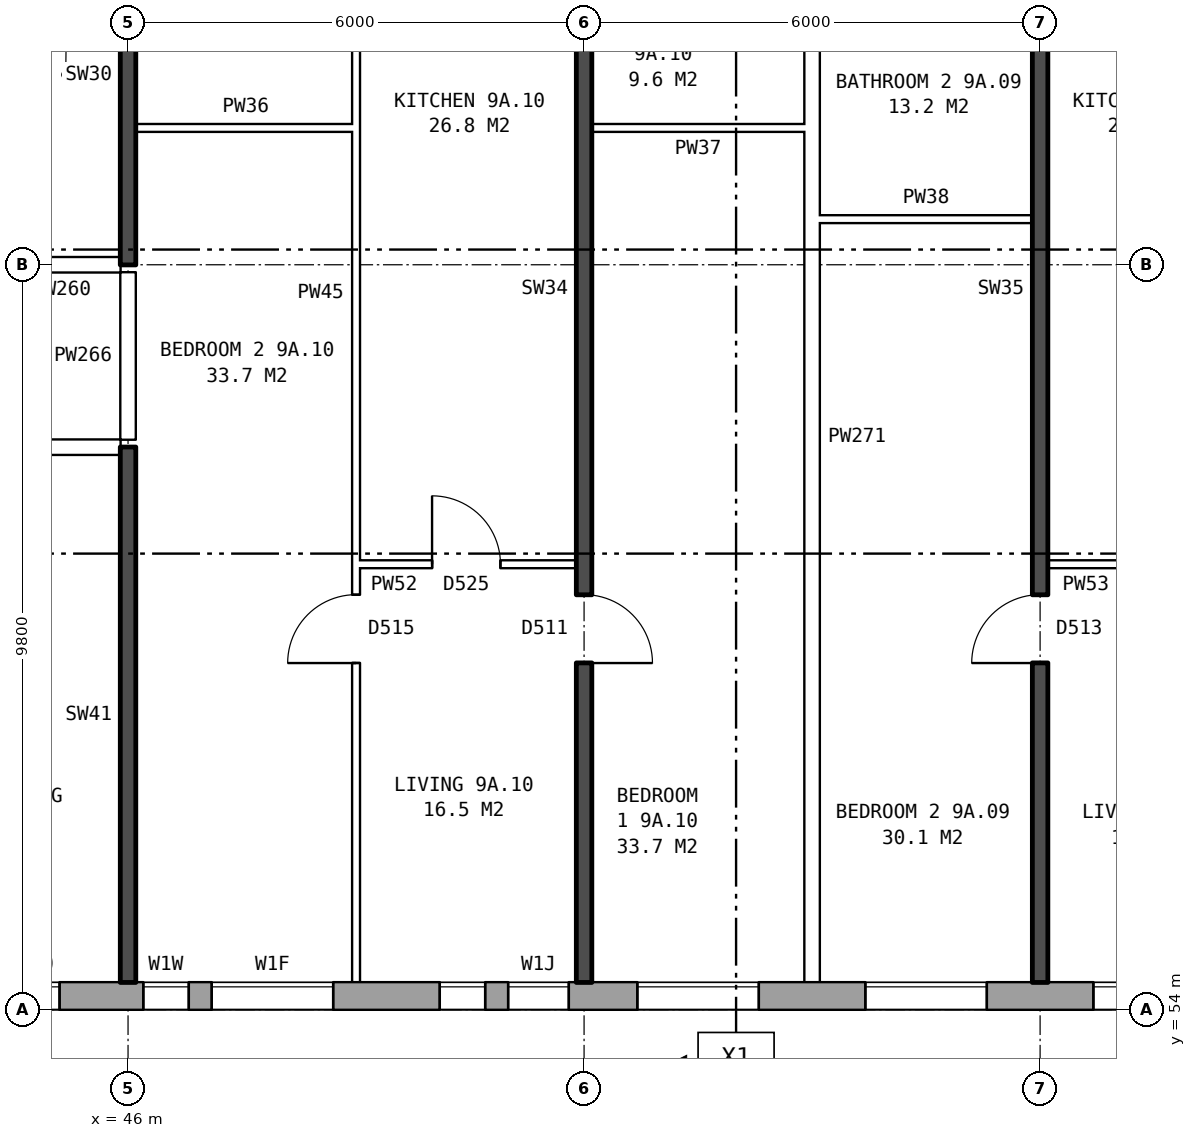
"""IFC4 building model, lengths in metres.
Left out: names, types, materials, properties, quantities, classifications, styles, units other than length and angle.
Written with IfcOpenShell. Run it as: python <this file> out.ifc"""

import sys

from ifc_helpers import new_model, si_unit, direction, frame, frame_2d, origin, place, context, subcontext, project, spatial, rectangle, extrude, element, fill, save


model = new_model("IFC4")
c1 = context("Model", 3, precision=1e-05, world=origin(), true_north=direction((0.0, 1.0)))
c2 = subcontext(c1, "Body", "Model", "MODEL_VIEW")
j1 = project(units=[si_unit("LENGTHUNIT", "METRE"), si_unit("PLANEANGLEUNIT", "RADIAN")], contexts=[c1])
p1 = place(None, origin())
s1 = spatial("IfcSite", under=j1, at=p1, CompositionType="ELEMENT")
p2 = place(p1, origin())
s2 = spatial("IfcBuilding", under=s1, at=p2, CompositionType="ELEMENT")
p3 = place(p2, frame((0.0, 0.0, 35.0)))
s3 = spatial("IfcBuildingStorey", under=s2, at=p3, CompositionType="ELEMENT", Elevation=35.0)
p4 = place(p3, frame((22.825, 54.18, 0.0), z_axis=(0.0, 0.0, 1.0), x_axis=(1.0, 0.0, 0.0)))
e1 = element("IfcWall", 1, at=p4, inside=s3, PredefinedType="STANDARD", context=c2, shape_type="SweptSolid", body=[
    extrude(rectangle(XDim=50.101, YDim=0.36, at=frame_2d((25.05, 0.0))), origin(), (0.0, 0.0, 1.0), 2.85),
])
p5 = place(p4, frame((2.875, 0.0, 0.8)))
e2 = element("IfcOpeningElement", 2, at=p5, cuts=e1, PredefinedType="OPENING", context=c2, shape_type="SweptSolid", body=[
    extrude(rectangle(XDim=1.6, YDim=1.8, at=frame_2d((0.8, 0.9))), frame((0.0, 0.19, 0.0), z_axis=(0.0, -1.0, 0.0), x_axis=(1.0, 0.0, 0.0)), (0.0, 0.0, 1.0), 0.38),
])
p6 = place(p4, frame((5.875, 0.0, 0.8)))
e3 = element("IfcOpeningElement", 3, at=p6, cuts=e1, PredefinedType="OPENING", context=c2, shape_type="SweptSolid", body=[
    extrude(rectangle(XDim=1.6, YDim=1.8, at=frame_2d((0.8, 0.9))), frame((0.0, 0.19, 0.0), z_axis=(0.0, -1.0, 0.0), x_axis=(1.0, 0.0, 0.0)), (0.0, 0.0, 1.0), 0.38),
])
p7 = place(p4, frame((8.875, 0.0, 0.8)))
e4 = element("IfcOpeningElement", 4, at=p7, cuts=e1, PredefinedType="OPENING", context=c2, shape_type="SweptSolid", body=[
    extrude(rectangle(XDim=1.6, YDim=1.8, at=frame_2d((0.8, 0.9))), frame((0.0, 0.19, 0.0), z_axis=(0.0, -1.0, 0.0), x_axis=(1.0, 0.0, 0.0)), (0.0, 0.0, 1.0), 0.38),
])
p8 = place(p4, frame((11.875, 0.0, 0.8)))
e5 = element("IfcOpeningElement", 5, at=p8, cuts=e1, PredefinedType="OPENING", context=c2, shape_type="SweptSolid", body=[
    extrude(rectangle(XDim=1.6, YDim=1.8, at=frame_2d((0.8, 0.9))), frame((0.0, 0.19, 0.0), z_axis=(0.0, -1.0, 0.0), x_axis=(1.0, 0.0, 0.0)), (0.0, 0.0, 1.0), 0.38),
])
p9 = place(p4, frame((14.875, 0.0, 0.8)))
e6 = element("IfcOpeningElement", 6, at=p9, cuts=e1, PredefinedType="OPENING", context=c2, shape_type="SweptSolid", body=[
    extrude(rectangle(XDim=1.6, YDim=1.8, at=frame_2d((0.8, 0.9))), frame((0.0, 0.19, 0.0), z_axis=(0.0, -1.0, 0.0), x_axis=(1.0, 0.0, 0.0)), (0.0, 0.0, 1.0), 0.38),
])
p10 = place(p4, frame((17.875, 0.0, 0.8)))
e7 = element("IfcOpeningElement", 7, at=p10, cuts=e1, PredefinedType="OPENING", context=c2, shape_type="SweptSolid", body=[
    extrude(rectangle(XDim=1.6, YDim=1.8, at=frame_2d((0.8, 0.9))), frame((0.0, 0.19, 0.0), z_axis=(0.0, -1.0, 0.0), x_axis=(1.0, 0.0, 0.0)), (0.0, 0.0, 1.0), 0.38),
])
p11 = place(p4, frame((19.775, 0.0, 0.8)))
e8 = element("IfcOpeningElement", 8, at=p11, cuts=e1, PredefinedType="OPENING", context=c2, shape_type="SweptSolid", body=[
    extrude(rectangle(XDim=1.6, YDim=1.8, at=frame_2d((0.8, 0.9))), frame((0.0, 0.19, 0.0), z_axis=(0.0, -1.0, 0.0), x_axis=(1.0, 0.0, 0.0)), (0.0, 0.0, 1.0), 0.38),
])
p12 = place(p4, frame((23.375, 0.0, 0.15)))
e9 = element("IfcOpeningElement", 9, at=p12, cuts=e1, PredefinedType="OPENING", context=c2, shape_type="SweptSolid", body=[
    extrude(rectangle(XDim=0.6, YDim=0.9, at=frame_2d((0.3, 0.45))), frame((0.0, 0.19, 0.0), z_axis=(0.0, -1.0, 0.0), x_axis=(1.0, 0.0, 0.0)), (0.0, 0.0, 1.0), 0.38),
])
p13 = place(p4, frame((27.275, 0.0, 1.7)))
e10 = element("IfcOpeningElement", 10, at=p13, cuts=e1, PredefinedType="OPENING", context=c2, shape_type="SweptSolid", body=[
    extrude(rectangle(XDim=0.6, YDim=0.9, at=frame_2d((0.3, 0.45))), frame((0.0, 0.19, 0.0), z_axis=(0.0, -1.0, 0.0), x_axis=(1.0, 0.0, 0.0)), (0.0, 0.0, 1.0), 0.38),
])
p14 = place(p4, frame((29.875, 0.0, 0.8)))
e11 = element("IfcOpeningElement", 11, at=p14, cuts=e1, PredefinedType="OPENING", context=c2, shape_type="SweptSolid", body=[
    extrude(rectangle(XDim=1.6, YDim=1.8, at=frame_2d((0.8, 0.9))), frame((0.0, 0.19, 0.0), z_axis=(0.0, -1.0, 0.0), x_axis=(1.0, 0.0, 0.0)), (0.0, 0.0, 1.0), 0.38),
])
p15 = place(p4, frame((32.875, 0.0, 0.8)))
e12 = element("IfcOpeningElement", 12, at=p15, cuts=e1, PredefinedType="OPENING", context=c2, shape_type="SweptSolid", body=[
    extrude(rectangle(XDim=1.6, YDim=1.8, at=frame_2d((0.8, 0.9))), frame((0.0, 0.19, 0.0), z_axis=(0.0, -1.0, 0.0), x_axis=(1.0, 0.0, 0.0)), (0.0, 0.0, 1.0), 0.38),
])
p16 = place(p4, frame((35.875, 0.0, 0.8)))
e13 = element("IfcOpeningElement", 13, at=p16, cuts=e1, PredefinedType="OPENING", context=c2, shape_type="SweptSolid", body=[
    extrude(rectangle(XDim=1.6, YDim=1.8, at=frame_2d((0.8, 0.9))), frame((0.0, 0.19, 0.0), z_axis=(0.0, -1.0, 0.0), x_axis=(1.0, 0.0, 0.0)), (0.0, 0.0, 1.0), 0.38),
])
p17 = place(p4, frame((38.875, 0.0, 0.8)))
e14 = element("IfcOpeningElement", 14, at=p17, cuts=e1, PredefinedType="OPENING", context=c2, shape_type="SweptSolid", body=[
    extrude(rectangle(XDim=1.6, YDim=1.8, at=frame_2d((0.8, 0.9))), frame((0.0, 0.19, 0.0), z_axis=(0.0, -1.0, 0.0), x_axis=(1.0, 0.0, 0.0)), (0.0, 0.0, 1.0), 0.38),
])
p18 = place(p4, frame((41.875, 0.0, 0.8)))
e15 = element("IfcOpeningElement", 15, at=p18, cuts=e1, PredefinedType="OPENING", context=c2, shape_type="SweptSolid", body=[
    extrude(rectangle(XDim=1.6, YDim=1.8, at=frame_2d((0.8, 0.9))), frame((0.0, 0.19, 0.0), z_axis=(0.0, -1.0, 0.0), x_axis=(1.0, 0.0, 0.0)), (0.0, 0.0, 1.0), 0.38),
])
p19 = place(p4, frame((44.875, 0.0, 0.8)))
e16 = element("IfcOpeningElement", 16, at=p19, cuts=e1, PredefinedType="OPENING", context=c2, shape_type="SweptSolid", body=[
    extrude(rectangle(XDim=1.6, YDim=1.8, at=frame_2d((0.8, 0.9))), frame((0.0, 0.19, 0.0), z_axis=(0.0, -1.0, 0.0), x_axis=(1.0, 0.0, 0.0)), (0.0, 0.0, 1.0), 0.38),
])
p20 = place(p4, frame((47.875, 0.0, 0.8)))
e17 = element("IfcOpeningElement", 17, at=p20, cuts=e1, PredefinedType="OPENING", context=c2, shape_type="SweptSolid", body=[
    extrude(rectangle(XDim=1.6, YDim=1.8, at=frame_2d((0.8, 0.9))), frame((0.0, 0.19, 0.0), z_axis=(0.0, -1.0, 0.0), x_axis=(1.0, 0.0, 0.0)), (0.0, 0.0, 1.0), 0.38),
])
p21 = place(p4, frame((21.675, 0.0, 1.4)))
e18 = element("IfcOpeningElement", 18, at=p21, cuts=e1, PredefinedType="OPENING", context=c2, shape_type="SweptSolid", body=[
    extrude(rectangle(XDim=0.6, YDim=1.2, at=frame_2d((0.3, 0.6))), frame((0.0, 0.19, 0.0), z_axis=(0.0, -1.0, 0.0), x_axis=(1.0, 0.0, 0.0)), (0.0, 0.0, 1.0), 0.38),
])
p22 = place(p4, frame((24.275, 0.0, 0.15)))
e19 = element("IfcOpeningElement", 19, at=p22, cuts=e1, PredefinedType="OPENING", context=c2, shape_type="SweptSolid", body=[
    extrude(rectangle(XDim=1.6, YDim=1.5, at=frame_2d((0.8, 0.75))), frame((0.0, 0.19, 0.0), z_axis=(0.0, -1.0, 0.0), x_axis=(1.0, 0.0, 0.0)), (0.0, 0.0, 1.0), 0.38),
])
p23 = place(p4, frame((28.175, 0.0, 1.1)))
e20 = element("IfcOpeningElement", 20, at=p23, cuts=e1, PredefinedType="OPENING", context=c2, shape_type="SweptSolid", body=[
    extrude(rectangle(XDim=0.8, YDim=1.5, at=frame_2d((0.4, 0.75))), frame((0.0, 0.19, 0.0), z_axis=(0.0, -1.0, 0.0), x_axis=(1.0, 0.0, 0.0)), (0.0, 0.0, 1.0), 0.38),
])
p24 = place(p3, frame((49.0, 59.86, 0.0), z_axis=(0.0, 0.0, 1.0), x_axis=(1.0, 0.0, 0.0)))
e21 = element("IfcWall", 21, at=p24, inside=s3, PredefinedType="PARTITIONING", context=c2, shape_type="SweptSolid", body=[
    extrude(rectangle(XDim=2.9, YDim=0.1, at=frame_2d((1.45, 0.0))), origin(), (0.0, 0.0, 1.0), 2.85),
])
p25 = place(p24, frame((1.0, 0.0, 0.0)))
e22 = element("IfcOpeningElement", 22, at=p25, cuts=e21, PredefinedType="OPENING", context=c2, shape_type="SweptSolid", body=[
    extrude(rectangle(XDim=0.9, YDim=2.1, at=frame_2d((0.45, 1.05))), frame((0.0, 0.06, 0.0), z_axis=(0.0, -1.0, 0.0), x_axis=(1.0, 0.0, 0.0)), (0.0, 0.0, 1.0), 0.12),
])
p26 = place(p3, frame((58.1, 59.86, 0.0), z_axis=(0.0, 0.0, 1.0), x_axis=(1.0, 0.0, 0.0)))
e23 = element("IfcWall", 23, at=p26, inside=s3, PredefinedType="PARTITIONING", context=c2, shape_type="SweptSolid", body=[
    extrude(rectangle(XDim=2.9, YDim=0.1, at=frame_2d((1.45, 0.0))), origin(), (0.0, 0.0, 1.0), 2.85),
])
p27 = place(p26, frame((1.0, 0.0, 0.0)))
e24 = element("IfcOpeningElement", 24, at=p27, cuts=e23, PredefinedType="OPENING", context=c2, shape_type="SweptSolid", body=[
    extrude(rectangle(XDim=0.9, YDim=2.1, at=frame_2d((0.45, 1.05))), frame((0.0, 0.06, 0.0), z_axis=(0.0, -1.0, 0.0), x_axis=(1.0, 0.0, 0.0)), (0.0, 0.0, 1.0), 0.12),
])
p28 = place(p3, frame((20.11, 61.4, 0.0), z_axis=(0.0, 0.0, 1.0), x_axis=(1.0, 0.0, 0.0)))
e25 = element("IfcWall", 25, at=p28, inside=s3, PredefinedType="PARTITIONING", context=c2, shape_type="SweptSolid", body=[
    extrude(rectangle(XDim=25.79, YDim=0.2, at=frame_2d((12.895, 0.0))), origin(), (0.0, 0.0, 1.0), 2.85),
])
p29 = place(p28, frame((23.34, 0.0, 0.0)))
e26 = element("IfcOpeningElement", 26, at=p29, cuts=e25, PredefinedType="OPENING", context=c2, shape_type="SweptSolid", body=[
    extrude(rectangle(XDim=1.0, YDim=2.1, at=frame_2d((0.5, 1.05))), frame((0.0, 0.11, 0.0), z_axis=(0.0, -1.0, 0.0), x_axis=(1.0, 0.0, 0.0)), (0.0, 0.0, 1.0), 0.22),
])
p30 = place(p28, frame((17.39, 0.0, 0.0)))
e27 = element("IfcOpeningElement", 27, at=p30, cuts=e25, PredefinedType="OPENING", context=c2, shape_type="SweptSolid", body=[
    extrude(rectangle(XDim=1.0, YDim=2.1, at=frame_2d((0.5, 1.05))), frame((0.0, 0.11, 0.0), z_axis=(0.0, -1.0, 0.0), x_axis=(1.0, 0.0, 0.0)), (0.0, 0.0, 1.0), 0.22),
])
p31 = place(p28, frame((11.39, 0.0, 0.0)))
e28 = element("IfcOpeningElement", 28, at=p31, cuts=e25, PredefinedType="OPENING", context=c2, shape_type="SweptSolid", body=[
    extrude(rectangle(XDim=1.0, YDim=2.1, at=frame_2d((0.5, 1.05))), frame((0.0, 0.11, 0.0), z_axis=(0.0, -1.0, 0.0), x_axis=(1.0, 0.0, 0.0)), (0.0, 0.0, 1.0), 0.22),
])
p32 = place(p28, frame((2.245, 0.0, 0.0)))
e29 = element("IfcOpeningElement", 29, at=p32, cuts=e25, PredefinedType="OPENING", context=c2, shape_type="SweptSolid", body=[
    extrude(rectangle(XDim=1.0, YDim=2.1, at=frame_2d((0.5, 1.05))), frame((0.0, 0.11, 0.0), z_axis=(0.0, -1.0, 0.0), x_axis=(1.0, 0.0, 0.0)), (0.0, 0.0, 1.0), 0.22),
])
p33 = place(p3, frame((44.36, 63.8, 0.0), z_axis=(0.0, 0.0, 1.0), x_axis=(1.0, 0.0, 0.0)))
e30 = element("IfcWall", 30, at=p33, inside=s3, PredefinedType="PARTITIONING", context=c2, shape_type="SweptSolid", body=[
    extrude(rectangle(XDim=1.54, YDim=0.2, at=frame_2d((0.77, 0.0))), origin(), (0.0, 0.0, 1.0), 2.85),
])
p34 = place(p3, frame((55.1, 64.4, 0.0), z_axis=(0.0, 0.0, 1.0), x_axis=(1.0, 0.0, 0.0)))
e31 = element("IfcWall", 31, at=p34, inside=s3, PredefinedType="PARTITIONING", context=c2, shape_type="SweptSolid", body=[
    extrude(rectangle(XDim=2.8, YDim=0.1, at=frame_2d((1.4, 0.0))), origin(), (0.0, 0.0, 1.0), 2.85),
])
p35 = place(p3, frame((46.1, 65.6, 0.0), z_axis=(0.0, 0.0, 1.0), x_axis=(1.0, 0.0, 0.0)))
e32 = element("IfcWall", 32, at=p35, inside=s3, PredefinedType="PARTITIONING", context=c2, shape_type="SweptSolid", body=[
    extrude(rectangle(XDim=2.9, YDim=0.1, at=frame_2d((1.45, 0.0))), origin(), (0.0, 0.0, 1.0), 2.85),
])
p36 = place(p3, frame((52.1, 65.6, 0.0), z_axis=(0.0, 0.0, 1.0), x_axis=(1.0, 0.0, 0.0)))
e33 = element("IfcWall", 33, at=p36, inside=s3, PredefinedType="PARTITIONING", context=c2, shape_type="SweptSolid", body=[
    extrude(rectangle(XDim=2.8, YDim=0.1, at=frame_2d((1.4, 0.0))), origin(), (0.0, 0.0, 1.0), 2.85),
])
p37 = place(p3, frame((46.0, 54.36, 0.0), z_axis=(0.0, 0.0, 1.0), x_axis=(0.0, 1.0, 0.0)))
e34 = element("IfcWall", 34, at=p37, inside=s3, PredefinedType="SOLIDWALL", context=c2, shape_type="SweptSolid", body=[
    extrude(rectangle(XDim=7.04, YDim=0.2, at=frame_2d((3.52, 0.0))), origin(), (0.0, 0.0, 1.0), 2.85),
])
p38 = place(p3, frame((46.0, 61.5, 0.0), z_axis=(0.0, 0.0, 1.0), x_axis=(0.0, 1.0, 0.0)))
e35 = element("IfcWall", 35, at=p38, inside=s3, PredefinedType="PARTITIONING", context=c2, shape_type="SweptSolid", body=[
    extrude(rectangle(XDim=2.2, YDim=0.2, at=frame_2d((1.1, 0.0))), origin(), (0.0, 0.0, 1.0), 2.85),
])
p39 = place(p3, frame((46.0, 63.8, 0.0), z_axis=(0.0, 0.0, 1.0), x_axis=(0.0, 1.0, 0.0)))
e36 = element("IfcWall", 36, at=p39, inside=s3, PredefinedType="SOLIDWALL", context=c2, shape_type="SweptSolid", body=[
    extrude(rectangle(XDim=5.0, YDim=0.2, at=frame_2d((2.5, 0.0))), origin(), (0.0, 0.0, 1.0), 2.85),
])
p40 = place(p3, frame((49.0, 54.36, 0.0), z_axis=(0.0, 0.0, 1.0), x_axis=(0.0, 1.0, 0.0)))
e37 = element("IfcWall", 37, at=p40, inside=s3, PredefinedType="PARTITIONING", context=c2, shape_type="SweptSolid", body=[
    extrude(rectangle(XDim=14.34, YDim=0.1, at=frame_2d((7.17, 0.0))), origin(), (0.0, 0.0, 1.0), 2.85),
])
p41 = place(p40, frame((4.2, 0.0, 0.0)))
e38 = element("IfcOpeningElement", 38, at=p41, cuts=e37, PredefinedType="OPENING", context=c2, shape_type="SweptSolid", body=[
    extrude(rectangle(XDim=0.9, YDim=2.1, at=frame_2d((0.45, 1.05))), frame((0.0, 0.06, 0.0), z_axis=(0.0, -1.0, 0.0), x_axis=(1.0, 0.0, 0.0)), (0.0, 0.0, 1.0), 0.12),
])
p42 = place(p40, frame((13.04, 0.0, 0.0)))
e39 = element("IfcOpeningElement", 39, at=p42, cuts=e37, PredefinedType="OPENING", context=c2, shape_type="SweptSolid", body=[
    extrude(rectangle(XDim=0.9, YDim=2.1, at=frame_2d((0.45, 1.05))), frame((0.0, 0.06, 0.0), z_axis=(0.0, -1.0, 0.0), x_axis=(1.0, 0.0, 0.0)), (0.0, 0.0, 1.0), 0.12),
])
p43 = place(p3, frame((52.0, 54.36, 0.0), z_axis=(0.0, 0.0, 1.0), x_axis=(0.0, 1.0, 0.0)))
e40 = element("IfcWall", 40, at=p43, inside=s3, PredefinedType="SOLIDWALL", context=c2, shape_type="SweptSolid", body=[
    extrude(rectangle(XDim=14.44, YDim=0.2, at=frame_2d((7.22, 0.0))), origin(), (0.0, 0.0, 1.0), 2.85),
])
p44 = place(p43, frame((4.2, 0.0, 0.0)))
e41 = element("IfcOpeningElement", 41, at=p44, cuts=e40, PredefinedType="OPENING", context=c2, shape_type="SweptSolid", body=[
    extrude(rectangle(XDim=0.9, YDim=2.1, at=frame_2d((0.45, 1.05))), frame((0.0, 0.11, 0.0), z_axis=(0.0, -1.0, 0.0), x_axis=(1.0, 0.0, 0.0)), (0.0, 0.0, 1.0), 0.22),
])
p45 = place(p43, frame((13.14, 0.0, 0.0)))
e42 = element("IfcOpeningElement", 42, at=p45, cuts=e40, PredefinedType="OPENING", context=c2, shape_type="SweptSolid", body=[
    extrude(rectangle(XDim=0.9, YDim=2.1, at=frame_2d((0.45, 1.05))), frame((0.0, 0.11, 0.0), z_axis=(0.0, -1.0, 0.0), x_axis=(1.0, 0.0, 0.0)), (0.0, 0.0, 1.0), 0.22),
])
p46 = place(p3, frame((55.0, 54.36, 0.0), z_axis=(0.0, 0.0, 1.0), x_axis=(0.0, 1.0, 0.0)))
e43 = element("IfcWall", 43, at=p46, inside=s3, PredefinedType="PARTITIONING", context=c2, shape_type="SweptSolid", body=[
    extrude(rectangle(XDim=14.34, YDim=0.2, at=frame_2d((7.17, 0.0))), origin(), (0.0, 0.0, 1.0), 2.85),
])
p47 = place(p3, frame((58.0, 54.36, 0.0), z_axis=(0.0, 0.0, 1.0), x_axis=(0.0, 1.0, 0.0)))
e44 = element("IfcWall", 44, at=p47, inside=s3, PredefinedType="SOLIDWALL", context=c2, shape_type="SweptSolid", body=[
    extrude(rectangle(XDim=14.44, YDim=0.2, at=frame_2d((7.22, 0.0))), origin(), (0.0, 0.0, 1.0), 2.85),
])
p48 = place(p47, frame((4.2, 0.0, 0.0)))
e45 = element("IfcOpeningElement", 45, at=p48, cuts=e44, PredefinedType="OPENING", context=c2, shape_type="SweptSolid", body=[
    extrude(rectangle(XDim=0.9, YDim=2.1, at=frame_2d((0.45, 1.05))), frame((0.0, 0.11, 0.0), z_axis=(0.0, -1.0, 0.0), x_axis=(1.0, 0.0, 0.0)), (0.0, 0.0, 1.0), 0.22),
])
p49 = place(p47, frame((13.14, 0.0, 0.0)))
e46 = element("IfcOpeningElement", 46, at=p49, cuts=e44, PredefinedType="OPENING", context=c2, shape_type="SweptSolid", body=[
    extrude(rectangle(XDim=0.9, YDim=2.1, at=frame_2d((0.45, 1.05))), frame((0.0, 0.11, 0.0), z_axis=(0.0, -1.0, 0.0), x_axis=(1.0, 0.0, 0.0)), (0.0, 0.0, 1.0), 0.22),
])
p50 = place(p12, origin())
e47 = element("IfcWindow", 47, at=p50, inside=s3, PartitioningType="SINGLE_PANEL", PredefinedType="WINDOW", context=c2, shape_type="SweptSolid", body=[
    extrude(rectangle(XDim=0.6, YDim=0.9, at=frame_2d((0.3, 0.45))), frame((0.0, 0.15, 0.0), z_axis=(0.0, -1.0, 0.0), x_axis=(1.0, 0.0, 0.0)), (0.0, 0.0, 1.0), 0.06),
])
fill(e9, e47)
p51 = place(p13, origin())
e48 = element("IfcWindow", 48, at=p51, inside=s3, PartitioningType="SINGLE_PANEL", PredefinedType="WINDOW", context=c2, shape_type="SweptSolid", body=[
    extrude(rectangle(XDim=0.6, YDim=0.9, at=frame_2d((0.3, 0.45))), frame((0.0, 0.15, 0.0), z_axis=(0.0, -1.0, 0.0), x_axis=(1.0, 0.0, 0.0)), (0.0, 0.0, 1.0), 0.06),
])
fill(e10, e48)
p52 = place(p14, origin())
e49 = element("IfcWindow", 49, at=p52, inside=s3, PartitioningType="SINGLE_PANEL", PredefinedType="WINDOW", context=c2, shape_type="SweptSolid", body=[
    extrude(rectangle(XDim=1.6, YDim=1.8, at=frame_2d((0.8, 0.9))), frame((0.0, 0.15, 0.0), z_axis=(0.0, -1.0, 0.0), x_axis=(1.0, 0.0, 0.0)), (0.0, 0.0, 1.0), 0.06),
])
fill(e11, e49)
p53 = place(p15, origin())
e50 = element("IfcWindow", 50, at=p53, inside=s3, PartitioningType="SINGLE_PANEL", PredefinedType="WINDOW", context=c2, shape_type="SweptSolid", body=[
    extrude(rectangle(XDim=1.6, YDim=1.8, at=frame_2d((0.8, 0.9))), frame((0.0, 0.15, 0.0), z_axis=(0.0, -1.0, 0.0), x_axis=(1.0, 0.0, 0.0)), (0.0, 0.0, 1.0), 0.06),
])
fill(e12, e50)
p54 = place(p16, origin())
e51 = element("IfcWindow", 51, at=p54, inside=s3, PartitioningType="SINGLE_PANEL", PredefinedType="WINDOW", context=c2, shape_type="SweptSolid", body=[
    extrude(rectangle(XDim=1.6, YDim=1.8, at=frame_2d((0.8, 0.9))), frame((0.0, 0.15, 0.0), z_axis=(0.0, -1.0, 0.0), x_axis=(1.0, 0.0, 0.0)), (0.0, 0.0, 1.0), 0.06),
])
fill(e13, e51)
p55 = place(p48, origin())
e52 = element("IfcDoor", 52, at=p55, inside=s3, OperationType="SINGLE_SWING_LEFT", PredefinedType="DOOR", context=c2, shape_type="SweptSolid", body=[
    extrude(rectangle(XDim=0.9, YDim=2.1, at=frame_2d((0.45, 1.05))), frame((0.0, 0.025, 0.0), z_axis=(0.0, -1.0, 0.0), x_axis=(1.0, 0.0, 0.0)), (0.0, 0.0, 1.0), 0.05),
])
fill(e45, e52)
p56 = place(p44, frame((0.9, 0.0, 0.0), z_axis=(0.0, 0.0, 1.0), x_axis=(-1.0, 0.0, 0.0)))
e53 = element("IfcDoor", 53, at=p56, inside=s3, OperationType="SINGLE_SWING_RIGHT", PredefinedType="DOOR", context=c2, shape_type="SweptSolid", body=[
    extrude(rectangle(XDim=0.9, YDim=2.1, at=frame_2d((0.45, 1.05))), frame((0.0, 0.025, 0.0), z_axis=(0.0, -1.0, 0.0), x_axis=(1.0, 0.0, 0.0)), (0.0, 0.0, 1.0), 0.05),
])
fill(e41, e53)
p57 = place(p41, origin())
e54 = element("IfcDoor", 54, at=p57, inside=s3, OperationType="SINGLE_SWING_LEFT", PredefinedType="DOOR", context=c2, shape_type="SweptSolid", body=[
    extrude(rectangle(XDim=0.9, YDim=2.1, at=frame_2d((0.45, 1.05))), frame((0.0, 0.025, 0.0), z_axis=(0.0, -1.0, 0.0), x_axis=(1.0, 0.0, 0.0)), (0.0, 0.0, 1.0), 0.05),
])
fill(e38, e54)
p58 = place(p25, origin())
e55 = element("IfcDoor", 55, at=p58, inside=s3, OperationType="SINGLE_SWING_LEFT", PredefinedType="DOOR", context=c2, shape_type="SweptSolid", body=[
    extrude(rectangle(XDim=0.9, YDim=2.1, at=frame_2d((0.45, 1.05))), frame((0.0, 0.025, 0.0), z_axis=(0.0, -1.0, 0.0), x_axis=(1.0, 0.0, 0.0)), (0.0, 0.0, 1.0), 0.05),
])
fill(e22, e55)
p59 = place(p21, origin())
e56 = element("IfcWindow", 56, at=p59, inside=s3, PartitioningType="SINGLE_PANEL", PredefinedType="WINDOW", context=c2, shape_type="SweptSolid", body=[
    extrude(rectangle(XDim=0.6, YDim=1.2, at=frame_2d((0.3, 0.6))), frame((0.0, 0.15, 0.0), z_axis=(0.0, -1.0, 0.0), x_axis=(1.0, 0.0, 0.0)), (0.0, 0.0, 1.0), 0.06),
])
fill(e18, e56)
p60 = place(p22, origin())
e57 = element("IfcWindow", 57, at=p60, inside=s3, PartitioningType="SINGLE_PANEL", PredefinedType="WINDOW", context=c2, shape_type="SweptSolid", body=[
    extrude(rectangle(XDim=1.6, YDim=1.5, at=frame_2d((0.8, 0.75))), frame((0.0, 0.15, 0.0), z_axis=(0.0, -1.0, 0.0), x_axis=(1.0, 0.0, 0.0)), (0.0, 0.0, 1.0), 0.06),
])
fill(e19, e57)
p61 = place(p23, origin())
e58 = element("IfcWindow", 58, at=p61, inside=s3, PartitioningType="SINGLE_PANEL", PredefinedType="WINDOW", context=c2, shape_type="SweptSolid", body=[
    extrude(rectangle(XDim=0.8, YDim=1.5, at=frame_2d((0.4, 0.75))), frame((0.0, 0.15, 0.0), z_axis=(0.0, -1.0, 0.0), x_axis=(1.0, 0.0, 0.0)), (0.0, 0.0, 1.0), 0.06),
])
fill(e20, e58)
save(model, sys.argv[1])
